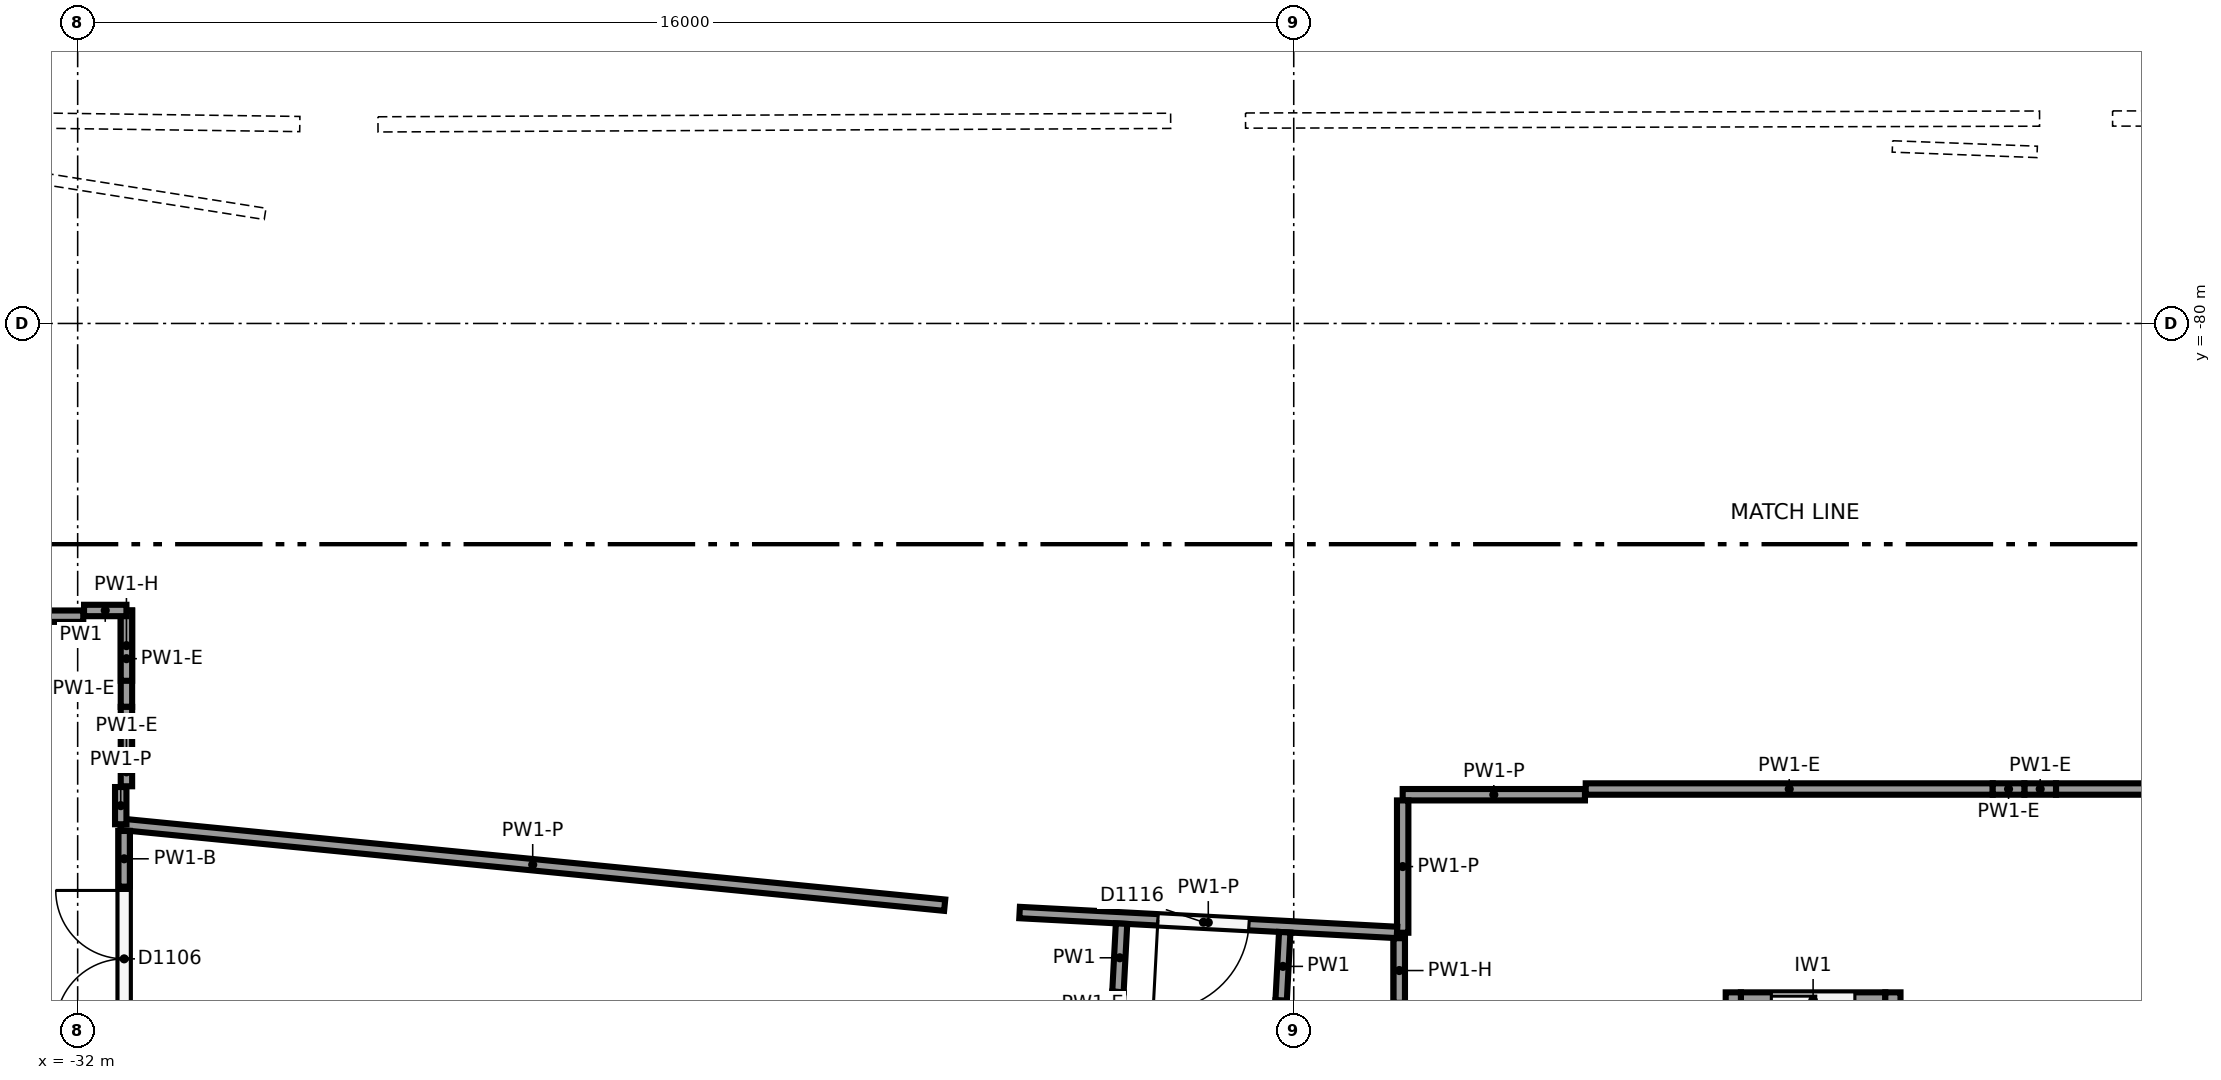
"""IFC4 building model, lengths in metres.
Left out: names, types, materials, properties, quantities, classifications, styles, units other than length and angle.
Written with IfcOpenShell. Run it as: python <this file> out.ifc"""

import sys

from ifc_helpers import new_model, si_unit, direction, frame, frame_2d, origin, origin_2d, place, context, subcontext, project, spatial, rectangle, circle, extrude, element, fill, save


model = new_model("IFC4")
c1 = context("Model", 3, precision=1e-05, world=origin(), true_north=direction((0.0, 1.0)))
c2 = subcontext(c1, "Body", "Model", "MODEL_VIEW")
j1 = project(units=[si_unit("LENGTHUNIT", "METRE"), si_unit("PLANEANGLEUNIT", "RADIAN")], contexts=[c1])
p1 = place(None, origin())
s1 = spatial("IfcSite", under=j1, at=p1, CompositionType="ELEMENT")
p2 = place(p1, origin())
s2 = spatial("IfcBuilding", under=s1, at=p2, CompositionType="ELEMENT")
p3 = place(p2, frame((0.0, 0.0, 12.0)))
s3 = spatial("IfcBuildingStorey", under=s2, at=p3, CompositionType="ELEMENT", Elevation=12.0)
p4 = place(p3, frame((-28.565, -77.383, 0.0), z_axis=(0.0, 0.0, 1.0), x_axis=(1.0, 0.0, 0.0)))
e1 = element("IfcColumn", 1, at=p4, inside=s3, PredefinedType="COLUMN", context=c2, shape_type="SweptSolid", body=[
    extrude(circle(Radius=0.35, at=origin_2d()), origin(), (0.0, 0.0, 1.0), 5.294),
])
p5 = place(p3, frame((-31.737, -85.377, 0.0), z_axis=(0.0, 0.0, 1.0), x_axis=(1.0, 0.0, 0.0)))
e2 = element("IfcColumn", 2, at=p5, inside=s3, PredefinedType="COLUMN", context=c2, shape_type="SweptSolid", body=[
    extrude(circle(Radius=0.4, at=origin_2d()), origin(), (0.0, 0.0, 1.0), 6.0),
])
p6 = place(p3, frame((-17.127, -77.332, 0.0), z_axis=(0.0, 0.0, 1.0), x_axis=(1.0, 0.0, 0.0)))
e3 = element("IfcColumn", 3, at=p6, inside=s3, PredefinedType="COLUMN", context=c2, shape_type="SweptSolid", body=[
    extrude(circle(Radius=0.35, at=origin_2d()), origin(), (0.0, 0.0, 1.0), 4.763),
])
p7 = place(p3, frame((-19.119, -85.698, 0.0), z_axis=(0.0, 0.0, 1.0), x_axis=(1.0, 0.0, 0.0)))
e4 = element("IfcColumn", 4, at=p7, inside=s3, PredefinedType="COLUMN", context=c2, shape_type="SweptSolid", body=[
    extrude(circle(Radius=0.4, at=origin_2d()), origin(), (0.0, 0.0, 1.0), 6.0),
])
p8 = place(p3, frame((-5.707, -77.304, 0.0), z_axis=(0.0, 0.0, 1.0), x_axis=(1.0, 0.0, 0.0)))
e5 = element("IfcColumn", 5, at=p8, inside=s3, PredefinedType="COLUMN", context=c2, shape_type="SweptSolid", body=[
    extrude(circle(Radius=0.35, at=origin_2d()), origin(), (0.0, 0.0, 1.0), 4.194),
])
p9 = place(p3, frame((-6.387, -85.877, 0.0), z_axis=(0.0, 0.0, 1.0), x_axis=(1.0, 0.0, 0.0)))
e6 = element("IfcColumn", 6, at=p9, inside=s3, PredefinedType="COLUMN", context=c2, shape_type="SweptSolid", body=[
    extrude(circle(Radius=0.4, at=origin_2d()), origin(), (0.0, 0.0, 1.0), 6.0),
])
for number, where, z_axis, x_axis in (
    (7, (-10.217, -91.8, 0.0), (0.0, 0.0, 1.0), (0.0, 1.0, 0.0)),
    (8, (-8.117, -91.8, 0.0), (0.0, 0.0, 1.0), (0.0, 1.0, 0.0)),
):
    element("IfcWall", number, at=place(p3, frame(where, z_axis=z_axis, x_axis=x_axis)), inside=s3, PredefinedType="SHEAR", context=c2, shape_type="SweptSolid", body=[
        extrude(rectangle(XDim=3.0, YDim=0.2, at=frame_2d((1.5, 0.0))), origin(), (0.0, 0.0, 1.0), 5.65),
    ])
p10 = place(p3, frame((-10.117, -88.9, 0.0), z_axis=(0.0, 0.0, 1.0), x_axis=(1.0, 0.0, 0.0)))
e9 = element("IfcWall", 9, at=p10, inside=s3, PredefinedType="SHEAR", context=c2, shape_type="SweptSolid", body=[
    extrude(rectangle(XDim=1.9, YDim=0.2, at=frame_2d((0.95, 0.0))), origin(), (0.0, 0.0, 1.0), 5.65),
])
p11 = place(p10, frame((0.4, 0.0, 0.0)))
e10 = element("IfcOpeningElement", 10, at=p11, cuts=e9, PredefinedType="OPENING", context=c2, shape_type="SweptSolid", body=[
    extrude(rectangle(XDim=1.1, YDim=2.1, at=frame_2d((0.55, 1.05))), frame((0.0, 0.11, 0.0), z_axis=(0.0, -1.0, 0.0), x_axis=(1.0, 0.0, 0.0)), (0.0, 0.0, 1.0), 0.22),
])
p12 = place(p3, frame((-35.211, -77.658, 0.0), z_axis=(0.0, 0.0, 1.0), x_axis=(0.987660465211, -0.156610361914, 0.0)))
e11 = element("IfcWall", 11, at=p12, inside=s3, PredefinedType="PARTITIONING", context=c2, shape_type="SweptSolid", body=[
    extrude(rectangle(XDim=5.748, YDim=0.15, at=frame_2d((2.874, 0.0))), origin(), (0.0, 0.0, 1.0), 3.697),
])
p13 = place(p3, frame((-31.926, -83.851, 0.0), z_axis=(0.0, 0.0, 1.0), x_axis=(-1.0, 0.0, 0.0)))
e12 = element("IfcWall", 12, at=p13, inside=s3, PredefinedType="PARTITIONING", context=c2, shape_type="SweptSolid", body=[
    extrude(rectangle(XDim=8.871, YDim=0.15, at=frame_2d((4.436, 0.0))), origin(), (0.0, 0.0, 1.0), 3.697),
])
p14 = place(p3, frame((-8.123, -77.671, 0.0), z_axis=(0.0, 0.0, 1.0), x_axis=(0.999290037332, -0.037675207871, 0.0)))
e13 = element("IfcWall", 13, at=p14, inside=s3, PredefinedType="PARTITIONING", context=c2, shape_type="SweptSolid", body=[
    extrude(rectangle(XDim=1.905, YDim=0.15, at=frame_2d((0.953, 0.0))), origin(), (0.0, 0.0, 1.0), 3.873),
])
p15 = place(p3, frame((-12.168, -86.2, 0.0), z_axis=(0.0, 0.0, 1.0), x_axis=(-1.0, 0.0, 0.0)))
e14 = element("IfcWall", 14, at=p15, inside=s3, PredefinedType="PARTITIONING", context=c2, shape_type="SweptSolid", body=[
    extrude(rectangle(XDim=2.398, YDim=0.15, at=frame_2d((1.199, 0.0))), origin(), (0.0, 0.0, 1.0), 3.907),
])
p16 = place(p3, frame((-14.567, -86.275, 0.0), z_axis=(0.0, 0.0, 1.0), x_axis=(0.0, -1.0, 0.0)))
e15 = element("IfcWall", 15, at=p16, inside=s3, PredefinedType="PARTITIONING", context=c2, shape_type="SweptSolid", body=[
    extrude(rectangle(XDim=1.741, YDim=0.15, at=frame_2d((0.871, 0.0))), origin(), (0.0, 0.0, 1.0), 3.907),
])
p17 = place(p3, frame((-14.642, -88.012, 0.0), z_axis=(0.0, 0.0, 1.0), x_axis=(-0.998613893233, 0.052633565738, 0.0)))
e16 = element("IfcWall", 16, at=p17, inside=s3, PredefinedType="PARTITIONING", context=c2, shape_type="SweptSolid", body=[
    extrude(rectangle(XDim=4.972, YDim=0.15, at=frame_2d((2.486, 0.0))), origin(), (0.0, 0.0, 1.0), 3.907),
])
p18 = place(p17, frame((1.95, 0.0, 0.0)))
e17 = element("IfcOpeningElement", 17, at=p18, cuts=e16, PredefinedType="OPENING", context=c2, shape_type="SweptSolid", body=[
    extrude(rectangle(XDim=1.2, YDim=2.1, at=frame_2d((0.6, 1.05))), frame((0.0, 0.085, 0.0), z_axis=(0.0, -1.0, 0.0), x_axis=(1.0, 0.0, 0.0)), (0.0, 0.0, 1.0), 0.17),
])
p19 = place(p3, frame((-20.593, -87.653, 0.0), z_axis=(0.0, 0.0, 1.0), x_axis=(-0.995211610703, 0.097743797362, 0.0)))
e18 = element("IfcWall", 18, at=p19, inside=s3, PredefinedType="PARTITIONING", context=c2, shape_type="SweptSolid", body=[
    extrude(rectangle(XDim=10.893, YDim=0.15, at=frame_2d((5.446, 0.0))), origin(), (0.0, 0.0, 1.0), 3.907),
])
p20 = place(p3, frame((-31.433, -86.589, 0.0), z_axis=(0.0, 0.0, 1.0), x_axis=(0.0, 1.0, 0.0)))
e19 = element("IfcWall", 19, at=p20, inside=s3, PredefinedType="PARTITIONING", context=c2, shape_type="SweptSolid", body=[
    extrude(rectangle(XDim=0.49, YDim=0.15, at=frame_2d((0.245, 0.0))), origin(), (0.0, 0.0, 1.0), 3.907),
])
p21 = place(p3, frame((-31.388, -91.809, 0.0), z_axis=(0.0, 0.0, 1.0), x_axis=(0.0, 1.0, 0.0)))
e20 = element("IfcWall", 20, at=p21, inside=s3, PredefinedType="PARTITIONING", context=c2, shape_type="SweptSolid", body=[
    extrude(rectangle(XDim=5.133, YDim=0.15, at=frame_2d((2.566, 0.0))), origin(), (0.0, 0.0, 1.0), 4.55),
])
p22 = place(p21, frame((2.55, 0.0, 0.0)))
e21 = element("IfcOpeningElement", 21, at=p22, cuts=e20, PredefinedType="OPENING", context=c2, shape_type="SweptSolid", body=[
    extrude(rectangle(XDim=1.8, YDim=2.1, at=frame_2d((0.9, 1.05))), frame((0.0, 0.085, 0.0), z_axis=(0.0, -1.0, 0.0), x_axis=(1.0, 0.0, 0.0)), (0.0, 0.0, 1.0), 0.17),
])
p23 = place(p3, frame((-31.358, -86.089, 0.0), z_axis=(0.0, 0.0, 1.0), x_axis=(0.0, 1.0, 0.0)))
e22 = element("IfcWall", 22, at=p23, inside=s3, PredefinedType="PARTITIONING", context=c2, shape_type="SweptSolid", body=[
    extrude(rectangle(XDim=0.38, YDim=0.15, at=frame_2d((0.19, 0.0))), origin(), (0.0, 0.0, 1.0), 4.35),
])
p24 = place(p3, frame((-31.358, -85.044, 0.0), z_axis=(0.0, 0.0, 1.0), x_axis=(0.0, 1.0, 0.0)))
e23 = element("IfcWall", 23, at=p24, inside=s3, PredefinedType="PARTITIONING", context=c2, shape_type="SweptSolid", body=[
    extrude(rectangle(XDim=1.268, YDim=0.15, at=frame_2d((0.634, 0.0))), origin(), (0.0, 0.0, 1.0), 4.35),
])
p25 = place(p3, frame((-31.358, -84.701, 4.35), z_axis=(0.0, 0.0, 1.0), x_axis=(0.0, 1.0, 0.0)))
e24 = element("IfcWall", 24, at=p25, inside=s3, PredefinedType="PARTITIONING", context=c2, shape_type="SweptSolid", body=[
    extrude(rectangle(XDim=0.925, YDim=0.15, at=frame_2d((0.462, 0.0))), origin(), (0.0, 0.0, 1.0), 1.3),
])
p26 = place(p3, frame((-31.358, -83.776, 0.0), z_axis=(0.0, 0.0, 1.0), x_axis=(-1.0, 0.0, 0.0)))
e25 = element("IfcWall", 25, at=p26, inside=s3, PredefinedType="PARTITIONING", context=c2, shape_type="SweptSolid", body=[
    extrude(rectangle(XDim=0.558, YDim=0.15, at=frame_2d((0.279, 0.0))), origin(), (0.0, 0.0, 1.0), 5.65),
])
p27 = place(p3, frame((-31.358, -85.709, 0.0), z_axis=(0.0, 0.0, 1.0), x_axis=(0.0, 1.0, 0.0)))
e26 = element("IfcWall", 26, at=p27, inside=s3, PredefinedType="PARTITIONING", context=c2, shape_type="SweptSolid", body=[
    extrude(rectangle(XDim=0.665, YDim=0.15, at=frame_2d((0.333, 0.0))), origin(), (0.0, 0.0, 1.0), 4.35),
])
p28 = place(p3, frame((-0.692, -86.125, 0.0), z_axis=(0.0, 0.0, 1.0), x_axis=(-1.0, 0.0, 0.0)))
e27 = element("IfcWall", 27, at=p28, inside=s3, PredefinedType="PARTITIONING", context=c2, shape_type="SweptSolid", body=[
    extrude(rectangle(XDim=5.279, YDim=0.15, at=frame_2d((2.64, 0.0))), origin(), (0.0, 0.0, 1.0), 4.35),
])
p29 = place(p3, frame((-6.803, -86.125, 0.0), z_axis=(0.0, 0.0, 1.0), x_axis=(-1.0, 0.0, 0.0)))
e28 = element("IfcWall", 28, at=p29, inside=s3, PredefinedType="PARTITIONING", context=c2, shape_type="SweptSolid", body=[
    extrude(rectangle(XDim=5.355, YDim=0.15, at=frame_2d((2.678, 0.0))), origin(), (0.0, 0.0, 1.0), 4.35),
])
p30 = place(p3, frame((-14.612, -88.088, 0.0), z_axis=(0.0, 0.0, 1.0), x_axis=(0.0, -1.0, 0.0)))
e29 = element("IfcWall", 29, at=p30, inside=s3, PredefinedType="PARTITIONING", context=c2, shape_type="SweptSolid", body=[
    extrude(rectangle(XDim=4.5, YDim=0.15, at=frame_2d((2.25, 0.0))), origin(), (0.0, 0.0, 1.0), 4.35),
])
p31 = place(p30, frame((0.95, 0.0, 0.0)))
e30 = element("IfcOpeningElement", 30, at=p31, cuts=e29, PredefinedType="OPENING", context=c2, shape_type="SweptSolid", body=[
    extrude(rectangle(XDim=1.8, YDim=2.1, at=frame_2d((0.9, 1.05))), frame((0.0, 0.085, 0.0), z_axis=(0.0, -1.0, 0.0), x_axis=(1.0, 0.0, 0.0)), (0.0, 0.0, 1.0), 0.17),
])
p32 = place(p3, frame((-14.612, -88.088, 4.35), z_axis=(0.0, 0.0, 1.0), x_axis=(0.0, -1.0, 0.0)))
e31 = element("IfcWall", 31, at=p32, inside=s3, PredefinedType="PARTITIONING", context=c2, shape_type="SweptSolid", body=[
    extrude(rectangle(XDim=0.851, YDim=0.15, at=frame_2d((0.425, 0.0))), origin(), (0.0, 0.0, 1.0), 1.3),
])
p33 = place(p3, frame((-5.971, -86.125, 0.0), z_axis=(0.0, 0.0, 1.0), x_axis=(-1.0, 0.0, 0.0)))
e32 = element("IfcWall", 32, at=p33, inside=s3, PredefinedType="PARTITIONING", context=c2, shape_type="SweptSolid", body=[
    extrude(rectangle(XDim=0.417, YDim=0.15, at=frame_2d((0.208, 0.0))), origin(), (0.0, 0.0, 1.0), 4.35),
])
p34 = place(p3, frame((-6.387, -86.125, 0.0), z_axis=(0.0, 0.0, 1.0), x_axis=(-1.0, 0.0, 0.0)))
e33 = element("IfcWall", 33, at=p34, inside=s3, PredefinedType="PARTITIONING", context=c2, shape_type="SweptSolid", body=[
    extrude(rectangle(XDim=0.416, YDim=0.15, at=frame_2d((0.208, 0.0))), origin(), (0.0, 0.0, 1.0), 4.35),
])
p35 = place(p3, frame((-16.119, -88.009, 0.0), z_axis=(0.0, 0.0, 1.0), x_axis=(-0.052630027564, -0.998614079712, 0.0)))
e34 = element("IfcWall", 34, at=p35, inside=s3, PredefinedType="PARTITIONING", context=c2, shape_type="SweptSolid", body=[
    extrude(rectangle(XDim=0.9, YDim=0.15, at=frame_2d((0.45, 0.0))), origin(), (0.0, 0.0, 1.0), 5.65),
])
p36 = place(p3, frame((-16.166, -88.908, 0.0), z_axis=(0.0, 0.0, 1.0), x_axis=(-0.052615773272, -0.998614830855, 0.0)))
e35 = element("IfcWall", 35, at=p36, inside=s3, PredefinedType="PARTITIONING", context=c2, shape_type="SweptSolid", body=[
    extrude(rectangle(XDim=0.45, YDim=0.15, at=frame_2d((0.225, 0.0))), origin(), (0.0, 0.0, 1.0), 4.35),
])
p37 = place(p3, frame((-18.266, -87.896, 0.0), z_axis=(0.0, 0.0, 1.0), x_axis=(-0.052615773272, -0.998614830855, 0.0)))
e36 = element("IfcWall", 36, at=p37, inside=s3, PredefinedType="PARTITIONING", context=c2, shape_type="SweptSolid", body=[
    extrude(rectangle(XDim=0.9, YDim=0.15, at=frame_2d((0.45, 0.0))), origin(), (0.0, 0.0, 1.0), 5.65),
])
p38 = place(p3, frame((-18.313, -88.795, 0.0), z_axis=(0.0, 0.0, 1.0), x_axis=(-0.052644289572, -0.998613327958, 0.0)))
e37 = element("IfcWall", 37, at=p38, inside=s3, PredefinedType="PARTITIONING", context=c2, shape_type="SweptSolid", body=[
    extrude(rectangle(XDim=0.45, YDim=0.15, at=frame_2d((0.225, 0.0))), origin(), (0.0, 0.0, 1.0), 4.35),
])
p39 = place(p3, frame((-31.388, -87.409, 4.55), z_axis=(0.0, 0.0, 1.0), x_axis=(0.0, 1.0, 0.0)))
e38 = element("IfcWall", 38, at=p39, inside=s3, PredefinedType="PARTITIONING", context=c2, shape_type="SweptSolid", body=[
    extrude(rectangle(XDim=0.732, YDim=0.15, at=frame_2d((0.366, 0.0))), origin(), (0.0, 0.0, 1.0), 1.1),
])
p40 = place(p11, origin())
e39 = element("IfcDoor", 39, at=p40, inside=s3, OperationType="SLIDING_TO_RIGHT", PredefinedType="DOOR", context=c2, shape_type="SweptSolid", body=[
    extrude(rectangle(XDim=1.1, YDim=2.1, at=frame_2d((0.55, 1.05))), frame((0.0, 0.025, 0.0), z_axis=(0.0, -1.0, 0.0), x_axis=(1.0, 0.0, 0.0)), (0.0, 0.0, 1.0), 0.05),
])
fill(e10, e39)
p41 = place(p18, origin())
e40 = element("IfcDoor", 40, at=p41, inside=s3, OperationType="SINGLE_SWING_RIGHT", PredefinedType="DOOR", context=c2, shape_type="SweptSolid", body=[
    extrude(rectangle(XDim=1.2, YDim=2.1, at=frame_2d((0.6, 1.05))), frame((0.0, 0.025, 0.0), z_axis=(0.0, -1.0, 0.0), x_axis=(1.0, 0.0, 0.0)), (0.0, 0.0, 1.0), 0.05),
])
fill(e17, e40)
p42 = place(p22, origin())
e41 = element("IfcDoor", 41, at=p42, inside=s3, OperationType="DOUBLE_DOOR_SINGLE_SWING", PredefinedType="DOOR", context=c2, shape_type="SweptSolid", body=[
    extrude(rectangle(XDim=1.8, YDim=2.1, at=frame_2d((0.9, 1.05))), frame((0.0, 0.025, 0.0), z_axis=(0.0, -1.0, 0.0), x_axis=(1.0, 0.0, 0.0)), (0.0, 0.0, 1.0), 0.05),
])
fill(e21, e41)
save(model, sys.argv[1])
